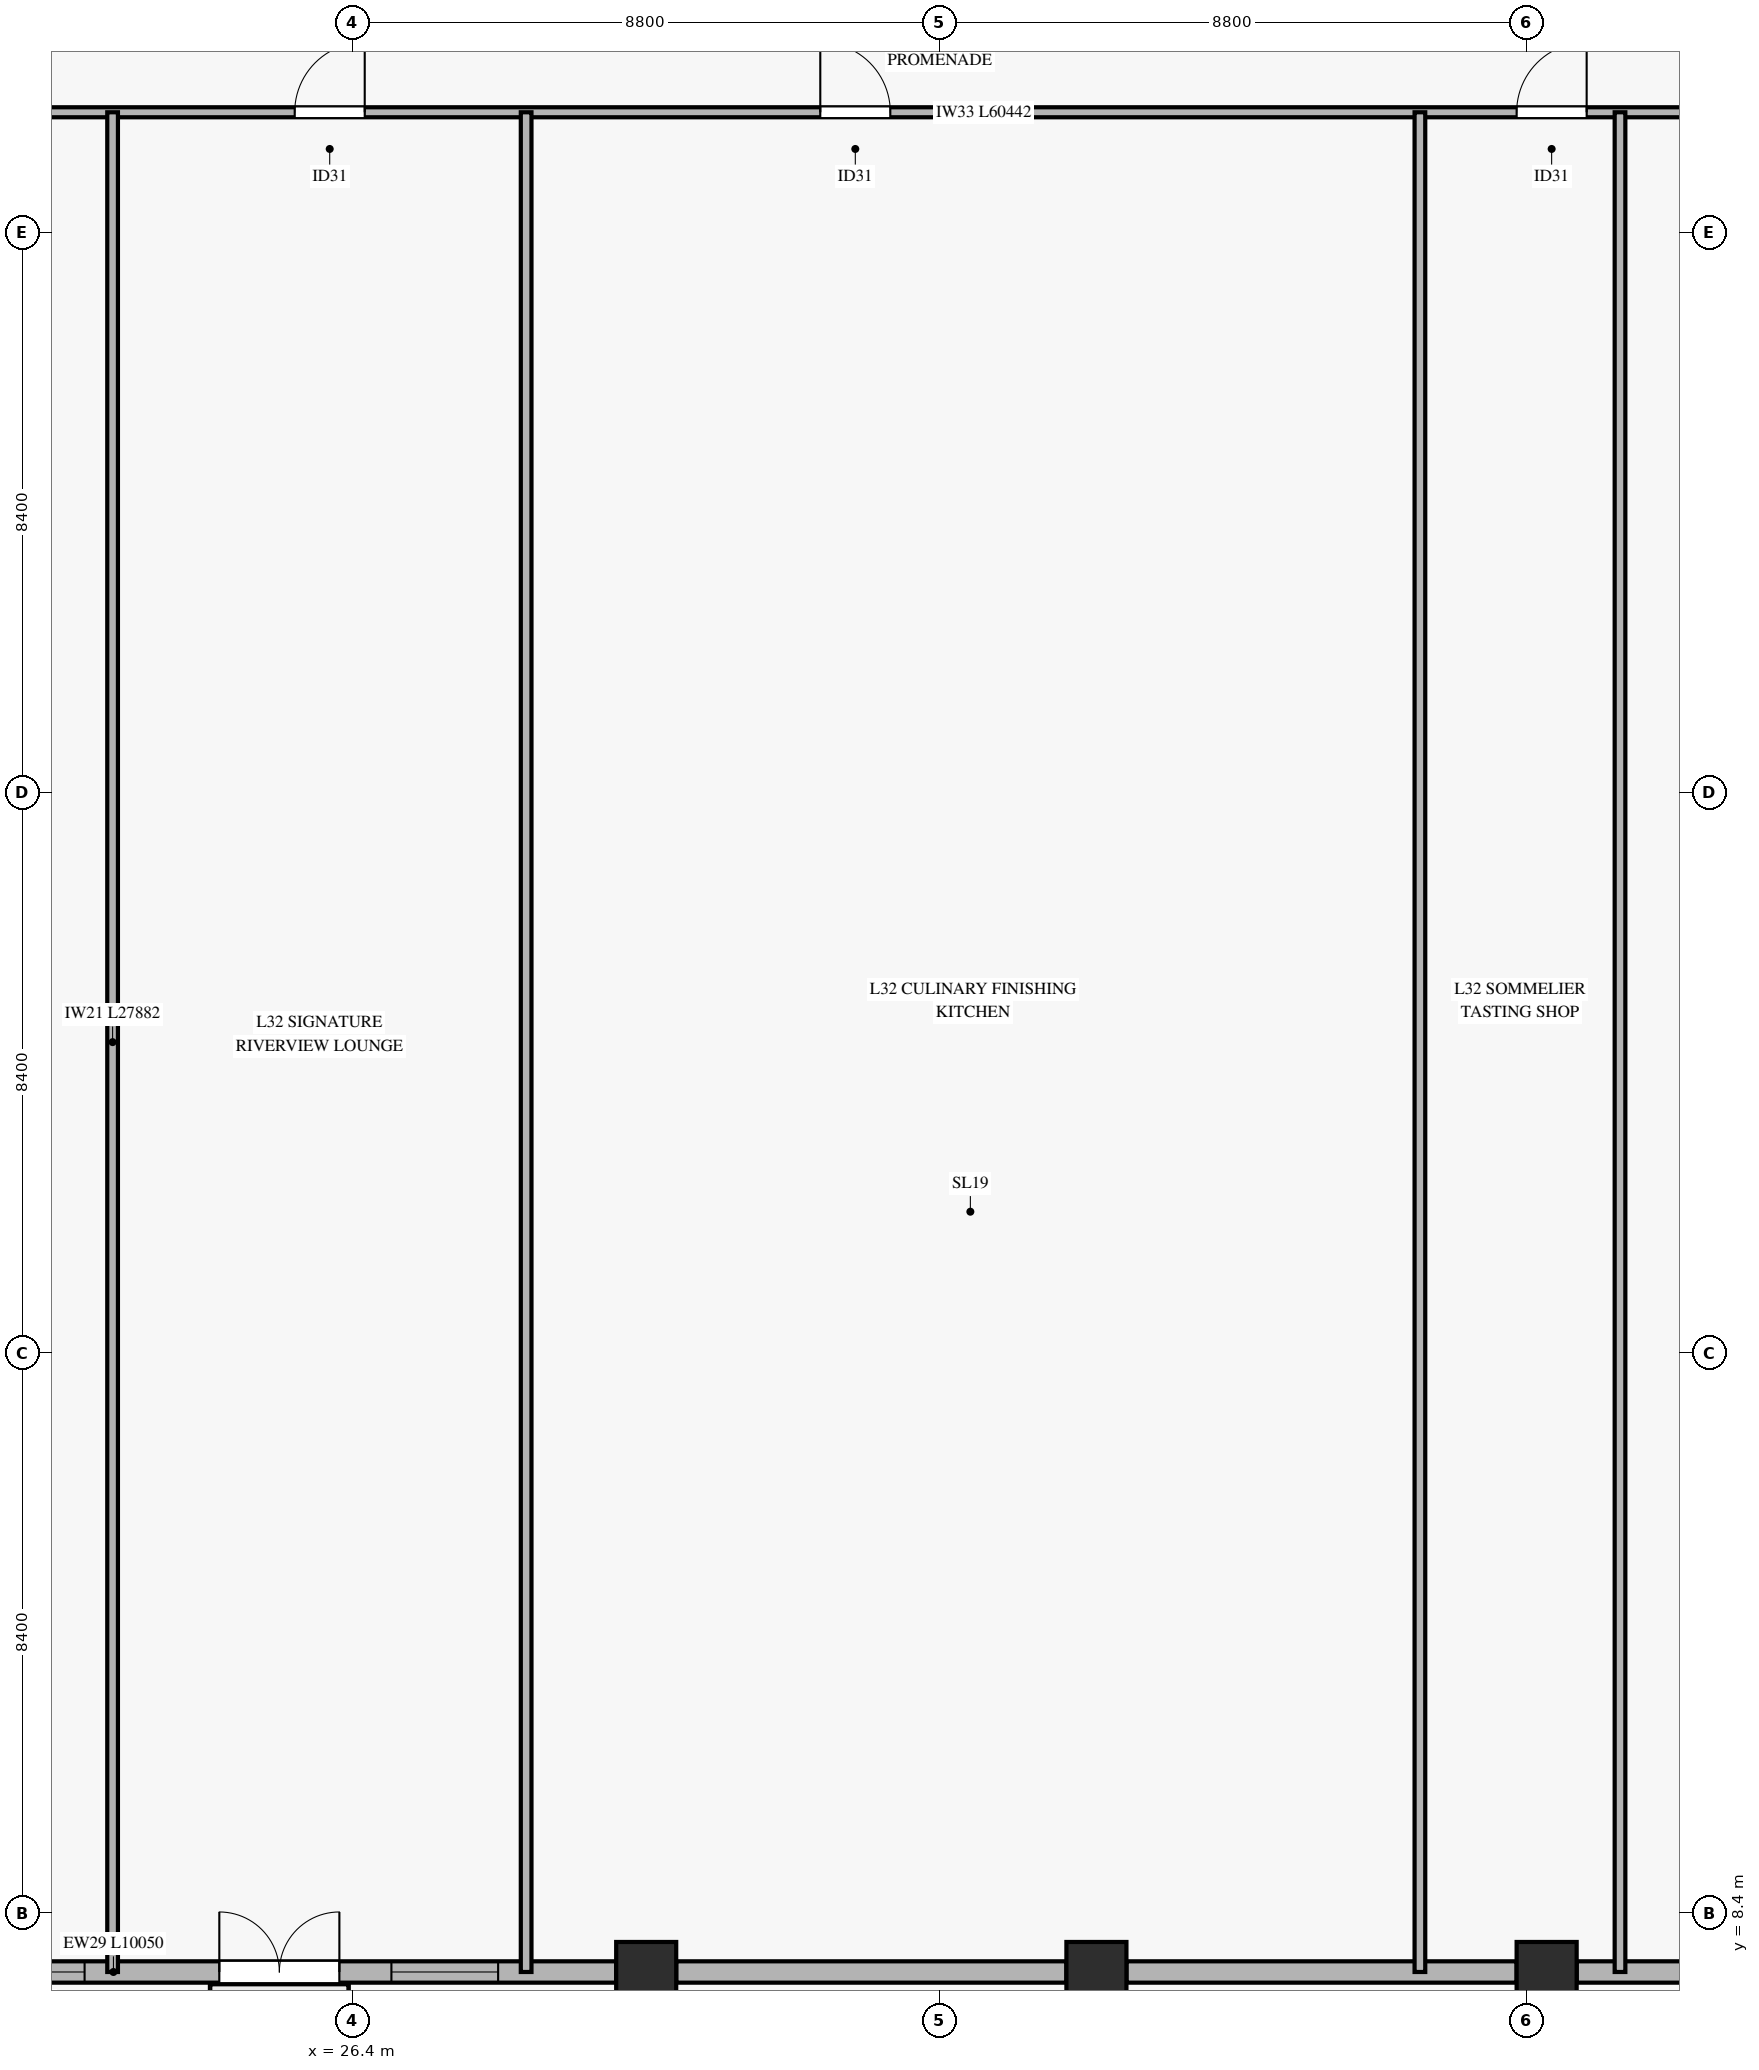
"""IFC4 building model, lengths in metres.
Left out: names, types, materials, properties, quantities, classifications, styles, units other than length and angle.
Written with IfcOpenShell. Run it as: python <this file> out.ifc"""

import sys

from ifc_helpers import new_model, si_unit, direction, frame, frame_2d, origin, origin_2d, place, context, subcontext, project, spatial, rectangle, hollow_rectangle, extrude, source, transform, mapped, element, fill, save


model = new_model("IFC4")
c1 = context("Model", 3, precision=1e-05, world=origin(), true_north=direction((0.0, 1.0)))
c2 = subcontext(c1, "Body", "Model", "MODEL_VIEW")
j1 = project(units=[si_unit("LENGTHUNIT", "METRE"), si_unit("PLANEANGLEUNIT", "RADIAN")], contexts=[c1])
p1 = place(None, origin())
s1 = spatial("IfcSite", under=j1, at=p1, CompositionType="ELEMENT")
p2 = place(p1, origin())
s2 = spatial("IfcBuilding", under=s1, at=p2, CompositionType="ELEMENT")
p3 = place(p2, frame((0.0, 0.0, 130.9)))
s3 = spatial("IfcBuildingStorey", under=s2, at=p3, CompositionType="ELEMENT", Elevation=130.9)
m1 = source(origin(), c2, "Body", "SweptSolid", [
    extrude(hollow_rectangle(XDim=0.9, YDim=0.9, WallThickness=0.04, at=origin_2d()), origin(), (0.0, 0.0, 1.0), 6.591),
])
for number, where, z_axis, x_axis in (
    (1, (30.8, 7.518, 0.0), (0.0, 0.08, 0.997), (-1.0, 0.0, 0.0)),
    (2, (37.55, 7.518, 0.0), (0.0, 0.08, 0.997), (-1.0, 0.0, 0.0)),
    (3, (44.3, 7.518, 0.0), (0.0, 0.08, 0.997), (-1.0, 0.0, 0.0)),
):
    element("IfcColumn", number, at=place(p3, frame(where, z_axis=z_axis, x_axis=x_axis)), inside=s3, PredefinedType="COLUMN", context=c2, shape_type="MappedRepresentation", body=[
        mapped(m1, transform((0.0, 0.0, 0.0), x_axis=(1.0, 0.0, 0.0), y_axis=(0.0, 1.0, 0.0), z_axis=(0.0, 0.0, 1.0), scale=1.0)),
    ])
p4 = place(p3, frame((20.3, 7.518, 0.0), z_axis=(0.0, 0.0, 1.0), x_axis=(1.0, 0.0, 0.0)))
e4 = element("IfcWall", 4, at=p4, inside=s3, PredefinedType="SOLIDWALL", context=c2, shape_type="SweptSolid", body=[
    extrude(rectangle(XDim=10.05, YDim=0.32, at=frame_2d((5.025, 0.0))), origin(), (0.0, 0.0, 1.0), 6.05),
])
p5 = place(p4, frame((4.1, 0.0, 0.0)))
e5 = element("IfcOpeningElement", 5, at=p5, cuts=e4, PredefinedType="OPENING", context=c2, shape_type="SweptSolid", body=[
    extrude(rectangle(XDim=1.8, YDim=2.3, at=frame_2d((0.9, 1.15))), frame((0.0, 0.17, 0.0), z_axis=(0.0, -1.0, 0.0), x_axis=(1.0, 0.0, 0.0)), (0.0, 0.0, 1.0), 0.34),
])
p6 = place(p4, frame((0.48, 0.0, 0.45)))
e6 = element("IfcOpeningElement", 6, at=p6, cuts=e4, PredefinedType="OPENING", context=c2, shape_type="SweptSolid", body=[
    extrude(rectangle(XDim=1.6, YDim=2.0, at=frame_2d((0.8, 1.0))), frame((0.0, 0.17, 0.0), z_axis=(0.0, -1.0, 0.0), x_axis=(1.0, 0.0, 0.0)), (0.0, 0.0, 1.0), 0.34),
])
p7 = place(p4, frame((6.68, 0.0, 0.45)))
e7 = element("IfcOpeningElement", 7, at=p7, cuts=e4, PredefinedType="OPENING", context=c2, shape_type="SweptSolid", body=[
    extrude(rectangle(XDim=1.6, YDim=2.0, at=frame_2d((0.8, 1.0))), frame((0.0, 0.17, 0.0), z_axis=(0.0, -1.0, 0.0), x_axis=(1.0, 0.0, 0.0)), (0.0, 0.0, 1.0), 0.34),
])
for number, where, z_axis, x_axis in (
    (8, (31.25, 7.518, 0.0), (0.0, 0.0, 1.0), (1.0, 0.0, 0.0)),
    (9, (38.0, 7.518, 0.0), (0.0, 0.0, 1.0), (1.0, 0.0, 0.0)),
):
    element("IfcWall", number, at=place(p3, frame(where, z_axis=z_axis, x_axis=x_axis)), inside=s3, PredefinedType="SOLIDWALL", context=c2, shape_type="SweptSolid", body=[
        extrude(rectangle(XDim=5.85, YDim=0.32, at=frame_2d((2.925, 0.0))), origin(), (0.0, 0.0, 1.0), 6.05),
    ])
p8 = place(p3, frame((44.75, 7.518, 0.0), z_axis=(0.0, 0.0, 1.0), x_axis=(1.0, 0.0, 0.0)))
e10 = element("IfcWall", 10, at=p8, inside=s3, PredefinedType="SOLIDWALL", context=c2, shape_type="SweptSolid", body=[
    extrude(rectangle(XDim=5.35, YDim=0.32, at=frame_2d((2.675, 0.0))), origin(), (0.0, 0.0, 1.0), 6.05),
])
p9 = place(p8, frame((1.75, 0.0, 0.0)))
e11 = element("IfcOpeningElement", 11, at=p9, cuts=e10, PredefinedType="OPENING", context=c2, shape_type="SweptSolid", body=[
    extrude(rectangle(XDim=1.8, YDim=2.3, at=frame_2d((0.9, 1.15))), frame((0.0, 0.17, 0.0), z_axis=(0.0, -1.0, 0.0), x_axis=(1.0, 0.0, 0.0)), (0.0, 0.0, 1.0), 0.34),
])
p10 = place(p3, frame((4.979, 35.4, 0.0), z_axis=(0.0, 0.0, 1.0), x_axis=(1.0, 0.0, 0.0)))
e12 = element("IfcWall", 12, at=p10, inside=s3, PredefinedType="PARTITIONING", context=c2, shape_type="SweptSolid", body=[
    extrude(rectangle(XDim=60.442, YDim=0.15, at=frame_2d((30.221, 0.0))), origin(), (0.0, 0.0, 1.0), 5.655),
])
p11 = place(p10, frame((7.639, 0.0, 0.0)))
e13 = element("IfcOpeningElement", 13, at=p11, cuts=e12, PredefinedType="OPENING", context=c2, shape_type="SweptSolid", body=[
    extrude(rectangle(XDim=1.05, YDim=2.15, at=frame_2d((0.525, 1.075))), frame((0.0, 0.085, 0.0), z_axis=(0.0, -1.0, 0.0), x_axis=(1.0, 0.0, 0.0)), (0.0, 0.0, 1.0), 0.17),
])
p12 = place(p10, frame((20.551, 0.0, 0.0)))
e14 = element("IfcOpeningElement", 14, at=p12, cuts=e12, PredefinedType="OPENING", context=c2, shape_type="SweptSolid", body=[
    extrude(rectangle(XDim=1.05, YDim=2.15, at=frame_2d((0.525, 1.075))), frame((0.0, 0.085, 0.0), z_axis=(0.0, -1.0, 0.0), x_axis=(1.0, 0.0, 0.0)), (0.0, 0.0, 1.0), 0.17),
])
p13 = place(p10, frame((28.431, 0.0, 0.0)))
e15 = element("IfcOpeningElement", 15, at=p13, cuts=e12, PredefinedType="OPENING", context=c2, shape_type="SweptSolid", body=[
    extrude(rectangle(XDim=1.05, YDim=2.15, at=frame_2d((0.525, 1.075))), frame((0.0, 0.085, 0.0), z_axis=(0.0, -1.0, 0.0), x_axis=(1.0, 0.0, 0.0)), (0.0, 0.0, 1.0), 0.17),
])
p14 = place(p10, frame((38.871, 0.0, 0.0)))
e16 = element("IfcOpeningElement", 16, at=p14, cuts=e12, PredefinedType="OPENING", context=c2, shape_type="SweptSolid", body=[
    extrude(rectangle(XDim=1.05, YDim=2.15, at=frame_2d((0.525, 1.075))), frame((0.0, 0.085, 0.0), z_axis=(0.0, -1.0, 0.0), x_axis=(1.0, 0.0, 0.0)), (0.0, 0.0, 1.0), 0.17),
])
p15 = place(p10, frame((48.505, 0.0, 0.0)))
e17 = element("IfcOpeningElement", 17, at=p15, cuts=e12, PredefinedType="OPENING", context=c2, shape_type="SweptSolid", body=[
    extrude(rectangle(XDim=1.05, YDim=2.15, at=frame_2d((0.525, 1.075))), frame((0.0, 0.085, 0.0), z_axis=(0.0, -1.0, 0.0), x_axis=(1.0, 0.0, 0.0)), (0.0, 0.0, 1.0), 0.17),
])
for number, where, z_axis, x_axis in (
    (18, (22.8, 7.518, 0.0), (0.0, 0.0, 1.0), (0.0, 1.0, 0.0)),
    (19, (29.0, 7.518, 0.0), (0.0, 0.0, 1.0), (0.0, 1.0, 0.0)),
    (20, (42.4, 7.518, 0.0), (0.0, 0.0, 1.0), (0.0, 1.0, 0.0)),
    (21, (45.4, 7.518, 0.0), (0.0, 0.0, 1.0), (0.0, 1.0, 0.0)),
):
    element("IfcWall", number, at=place(p3, frame(where, z_axis=z_axis, x_axis=x_axis)), inside=s3, PredefinedType="PARTITIONING", context=c2, shape_type="SweptSolid", body=[
        extrude(rectangle(XDim=27.882, YDim=0.16, at=frame_2d((13.941, 0.0))), origin(), (0.0, 0.0, 1.0), 6.055),
    ])
m2 = source(origin(), c2, "Body", "SweptSolid", [
    extrude(rectangle(XDim=1.8, YDim=2.3, at=frame_2d((0.9, 1.15))), frame((0.0, 0.025, 0.0), z_axis=(0.0, -1.0, 0.0), x_axis=(1.0, 0.0, 0.0)), (0.0, 0.0, 1.0), 0.05),
])
p16 = place(p5, origin())
e22 = element("IfcDoor", 22, at=p16, inside=s3, OperationType="DOUBLE_SWING_LEFT", PredefinedType="DOOR", context=c2, shape_type="MappedRepresentation", body=[
    mapped(m2, transform((0.0, 0.0, 0.0), x_axis=(1.0, 0.0, 0.0), y_axis=(0.0, 1.0, 0.0), z_axis=(0.0, 0.0, 1.0), scale=1.0)),
])
fill(e5, e22)
m3 = source(origin(), c2, "Body", "SweptSolid", [
    extrude(rectangle(XDim=1.6, YDim=2.0, at=frame_2d((0.8, 1.0))), frame((0.0, 0.03, 0.0), z_axis=(0.0, -1.0, 0.0), x_axis=(1.0, 0.0, 0.0)), (0.0, 0.0, 1.0), 0.06),
])
p17 = place(p6, origin())
e23 = element("IfcWindow", 23, at=p17, inside=s3, PartitioningType="SINGLE_PANEL", PredefinedType="WINDOW", context=c2, shape_type="MappedRepresentation", body=[
    mapped(m3, transform((0.0, 0.0, 0.0), x_axis=(1.0, 0.0, 0.0), y_axis=(0.0, 1.0, 0.0), z_axis=(0.0, 0.0, 1.0), scale=1.0)),
])
fill(e6, e23)
p18 = place(p7, origin())
e24 = element("IfcWindow", 24, at=p18, inside=s3, PartitioningType="SINGLE_PANEL", PredefinedType="WINDOW", context=c2, shape_type="MappedRepresentation", body=[
    mapped(m3, transform((0.0, 0.0, 0.0), x_axis=(1.0, 0.0, 0.0), y_axis=(0.0, 1.0, 0.0), z_axis=(0.0, 0.0, 1.0), scale=1.0)),
])
fill(e7, e24)
m4 = source(origin(), c2, "Body", "SweptSolid", [
    extrude(rectangle(XDim=1.05, YDim=2.15, at=frame_2d((0.525, 1.075))), frame((0.0, 0.025, 0.0), z_axis=(0.0, -1.0, 0.0), x_axis=(1.0, 0.0, 0.0)), (0.0, 0.0, 1.0), 0.05),
])
p19 = place(p12, origin())
e25 = element("IfcDoor", 25, at=p19, inside=s3, OperationType="SINGLE_SWING_RIGHT", PredefinedType="DOOR", context=c2, shape_type="MappedRepresentation", body=[
    mapped(m4, transform((0.0, 0.0, 0.0), x_axis=(1.0, 0.0, 0.0), y_axis=(0.0, 1.0, 0.0), z_axis=(0.0, 0.0, 1.0), scale=1.0)),
])
fill(e14, e25)
p20 = place(p13, origin())
e26 = element("IfcDoor", 26, at=p20, inside=s3, OperationType="SINGLE_SWING_LEFT", PredefinedType="DOOR", context=c2, shape_type="MappedRepresentation", body=[
    mapped(m4, transform((0.0, 0.0, 0.0), x_axis=(1.0, 0.0, 0.0), y_axis=(0.0, 1.0, 0.0), z_axis=(0.0, 0.0, 1.0), scale=1.0)),
])
fill(e15, e26)
p21 = place(p14, origin())
e27 = element("IfcDoor", 27, at=p21, inside=s3, OperationType="SINGLE_SWING_RIGHT", PredefinedType="DOOR", context=c2, shape_type="MappedRepresentation", body=[
    mapped(m4, transform((0.0, 0.0, 0.0), x_axis=(1.0, 0.0, 0.0), y_axis=(0.0, 1.0, 0.0), z_axis=(0.0, 0.0, 1.0), scale=1.0)),
])
fill(e16, e27)
save(model, sys.argv[1])
